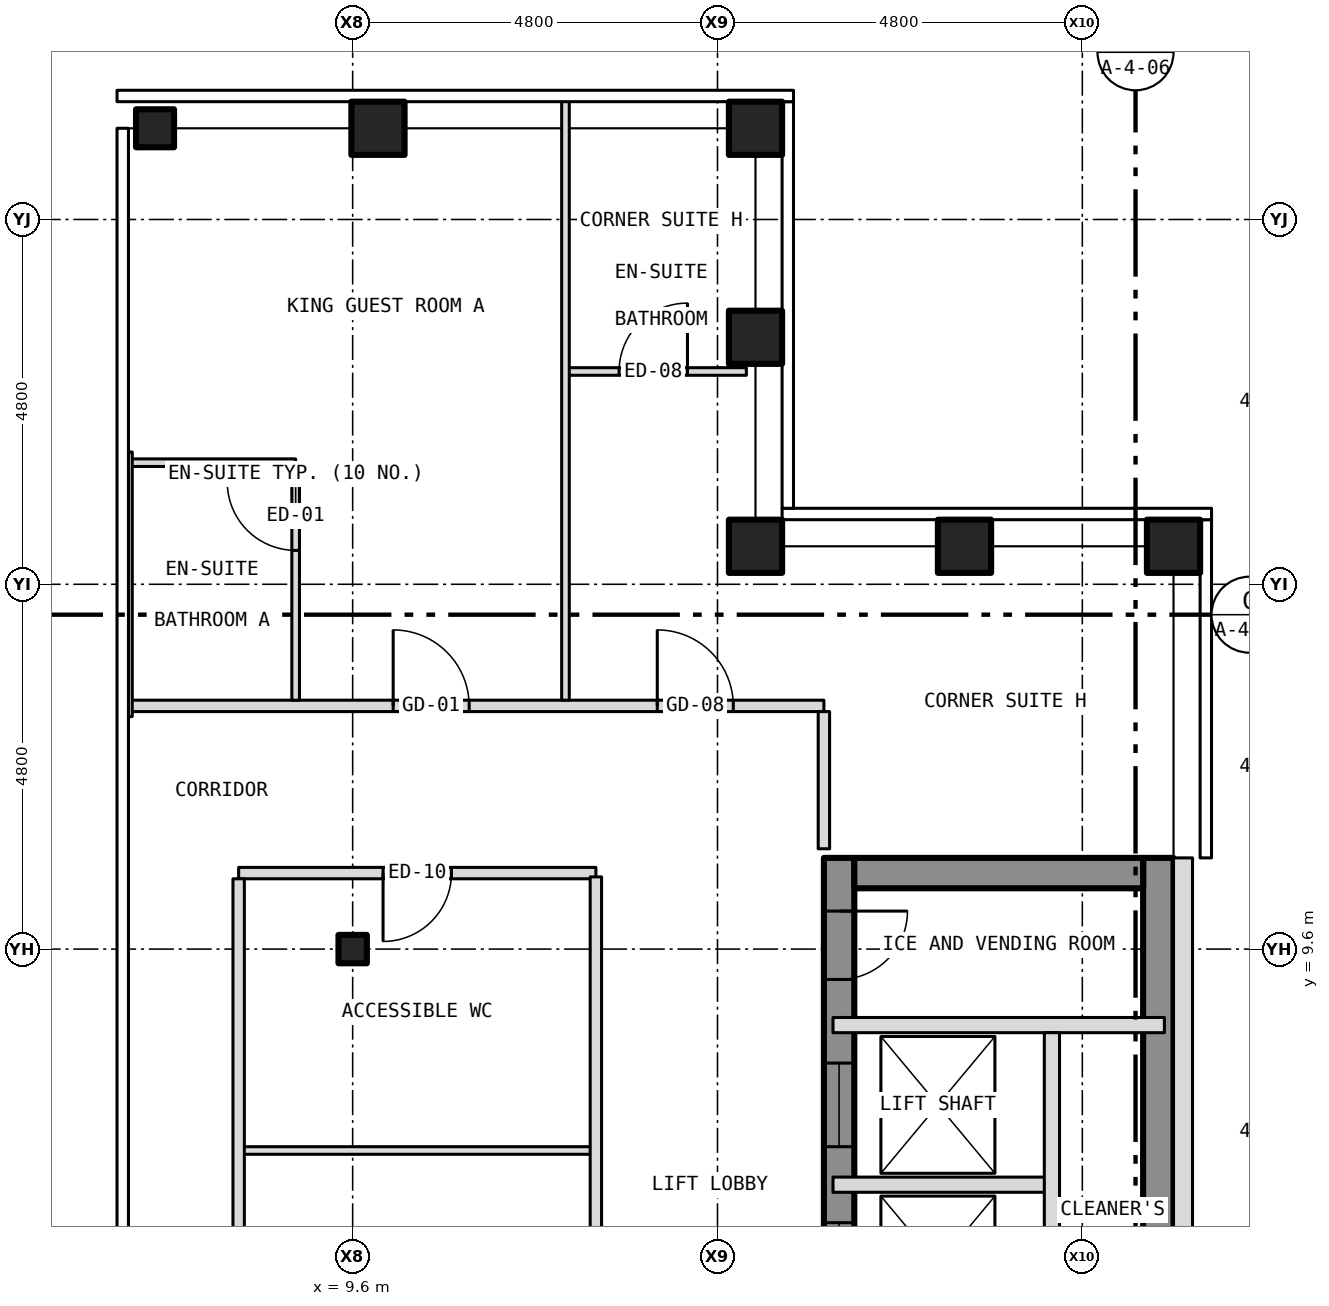
"""IFC4 building model, lengths in metres.
Left out: names, types, materials, properties, quantities, classifications, styles, units other than length and angle.
Written with IfcOpenShell. Run it as: python <this file> out.ifc"""

import sys

from ifc_helpers import new_model, si_unit, direction, frame, frame_2d, origin, origin_2d, place, context, subcontext, project, spatial, rectangle, hollow_rectangle, i_section, extrude, element, fill, save


model = new_model("IFC4")
c1 = context("Model", 3, precision=1e-05, world=origin(), true_north=direction((0.0, 1.0)))
c2 = subcontext(c1, "Body", "Model", "MODEL_VIEW")
j1 = project(units=[si_unit("LENGTHUNIT", "METRE"), si_unit("PLANEANGLEUNIT", "RADIAN")], contexts=[c1])
p1 = place(None, origin())
s1 = spatial("IfcSite", under=j1, at=p1, CompositionType="ELEMENT")
p2 = place(p1, origin())
s2 = spatial("IfcBuilding", under=s1, at=p2, CompositionType="ELEMENT")
p3 = place(p2, frame((0.0, 0.0, 222.5)))
s3 = spatial("IfcBuildingStorey", under=s2, at=p3, CompositionType="ELEMENT", Elevation=222.5)
for number, where, z_axis, x_axis in (
    (1, (9.933, 20.4, -0.15), (0.0, 0.0, 1.0), (1.0, 0.0, 0.0)),
    (2, (14.9, 20.4, -0.15), (0.0, 0.0, 1.0), (1.0, 0.0, 0.0)),
    (3, (20.4, 14.9, -0.15), (0.0, 0.0, 1.0), (1.0, 0.0, 0.0)),
    (4, (14.9, 14.9, -0.15), (0.0, 0.0, 1.0), (1.0, 0.0, 0.0)),
    (5, (14.9, 17.65, -0.15), (0.0, 0.0, 1.0), (1.0, 0.0, 0.0)),
    (6, (17.65, 14.9, -0.15), (0.0, 0.0, 1.0), (1.0, 0.0, 0.0)),
):
    element("IfcColumn", number, at=place(p3, frame(where, z_axis=z_axis, x_axis=x_axis)), inside=s3, PredefinedType="COLUMN", context=c2, shape_type="SweptSolid", body=[
        extrude(hollow_rectangle(XDim=0.7, YDim=0.7, WallThickness=0.04, at=origin_2d()), origin(), (0.0, 0.0, 1.0), 3.5),
    ])
p4 = place(p3, frame((7.0, 20.4, -0.15), z_axis=(0.0, 0.0, 1.0), x_axis=(1.0, 0.0, 0.0)))
e7 = element("IfcColumn", 7, at=p4, inside=s3, PredefinedType="COLUMN", context=c2, shape_type="SweptSolid", body=[
    extrude(hollow_rectangle(XDim=0.5, YDim=0.5, WallThickness=0.03, at=origin_2d()), origin(), (0.0, 0.0, 1.0), 3.5),
])
p5 = place(p3, frame((9.6, 9.6, -0.15), z_axis=(0.0, 0.0, 1.0), x_axis=(1.0, 0.0, 0.0)))
e8 = element("IfcColumn", 8, at=p5, inside=s3, PredefinedType="COLUMN", context=c2, shape_type="SweptSolid", body=[
    extrude(i_section(OverallWidth=0.373, OverallDepth=0.373, WebThickness=0.016, FlangeThickness=0.026, at=origin_2d()), origin(), (0.0, 0.0, 1.0), 3.5),
])
p6 = place(p3, frame((16.0, -10.8, 0.0), z_axis=(0.0, 0.0, 1.0), x_axis=(0.0, 1.0, 0.0)))
e9 = element("IfcWall", 9, at=p6, inside=s3, PredefinedType="SHEAR", context=c2, shape_type="SweptSolid", body=[
    extrude(rectangle(XDim=21.6, YDim=0.4, at=frame_2d((10.8, 0.0))), origin(), (0.0, 0.0, 1.0), 3.25),
])
p7 = place(p6, frame((9.4, 0.0, 0.0)))
e10 = element("IfcOpeningElement", 10, at=p7, cuts=e9, PredefinedType="OPENING", context=c2, shape_type="SweptSolid", body=[
    extrude(rectangle(XDim=1.1, YDim=2.1, at=frame_2d((0.55, 1.05))), frame((0.0, 0.212, 0.0), z_axis=(0.0, -1.0, 0.0), x_axis=(1.0, 0.0, 0.0)), (0.0, 0.0, 1.0), 0.424),
])
p8 = place(p6, frame((11.5, 0.0, 0.0)))
e11 = element("IfcOpeningElement", 11, at=p8, cuts=e9, PredefinedType="OPENING", context=c2, shape_type="SweptSolid", body=[
    extrude(rectangle(XDim=1.1, YDim=2.1, at=frame_2d((0.55, 1.05))), frame((0.0, 0.212, 0.0), z_axis=(0.0, -1.0, 0.0), x_axis=(1.0, 0.0, 0.0)), (0.0, 0.0, 1.0), 0.424),
])
p9 = place(p6, frame((13.6, 0.0, 0.0)))
e12 = element("IfcOpeningElement", 12, at=p9, cuts=e9, PredefinedType="OPENING", context=c2, shape_type="SweptSolid", body=[
    extrude(rectangle(XDim=1.1, YDim=2.1, at=frame_2d((0.55, 1.05))), frame((0.0, 0.212, 0.0), z_axis=(0.0, -1.0, 0.0), x_axis=(1.0, 0.0, 0.0)), (0.0, 0.0, 1.0), 0.424),
])
p10 = place(p6, frame((15.7, 0.0, 0.0)))
e13 = element("IfcOpeningElement", 13, at=p10, cuts=e9, PredefinedType="OPENING", context=c2, shape_type="SweptSolid", body=[
    extrude(rectangle(XDim=1.1, YDim=2.1, at=frame_2d((0.55, 1.05))), frame((0.0, 0.212, 0.0), z_axis=(0.0, -1.0, 0.0), x_axis=(1.0, 0.0, 0.0)), (0.0, 0.0, 1.0), 0.424),
])
p11 = place(p6, frame((17.8, 0.0, 0.0)))
e14 = element("IfcOpeningElement", 14, at=p11, cuts=e9, PredefinedType="OPENING", context=c2, shape_type="SweptSolid", body=[
    extrude(rectangle(XDim=1.1, YDim=2.1, at=frame_2d((0.55, 1.05))), frame((0.0, 0.212, 0.0), z_axis=(0.0, -1.0, 0.0), x_axis=(1.0, 0.0, 0.0)), (0.0, 0.0, 1.0), 0.424),
])
p12 = place(p6, frame((5.642, 0.0, 0.0)))
e15 = element("IfcOpeningElement", 15, at=p12, cuts=e9, PredefinedType="OPENING", context=c2, shape_type="SweptSolid", body=[
    extrude(rectangle(XDim=1.1, YDim=2.1, at=frame_2d((0.55, 1.05))), frame((0.0, 0.212, 0.0), z_axis=(0.0, -1.0, 0.0), x_axis=(1.0, 0.0, 0.0)), (0.0, 0.0, 1.0), 0.424),
])
p13 = place(p6, frame((7.5, 0.0, 0.0)))
e16 = element("IfcOpeningElement", 16, at=p13, cuts=e9, PredefinedType="OPENING", context=c2, shape_type="SweptSolid", body=[
    extrude(rectangle(XDim=1.1, YDim=2.1, at=frame_2d((0.55, 1.05))), frame((0.0, 0.212, 0.0), z_axis=(0.0, -1.0, 0.0), x_axis=(1.0, 0.0, 0.0)), (0.0, 0.0, 1.0), 0.424),
])
p14 = place(p6, frame((20.0, 0.0, 0.0)))
e17 = element("IfcOpeningElement", 17, at=p14, cuts=e9, PredefinedType="OPENING", context=c2, shape_type="SweptSolid", body=[
    extrude(rectangle(XDim=0.9, YDim=2.1, at=frame_2d((0.45, 1.05))), frame((0.0, 0.212, 0.0), z_axis=(0.0, -1.0, 0.0), x_axis=(1.0, 0.0, 0.0)), (0.0, 0.0, 1.0), 0.424),
])
p15 = place(p3, frame((20.2, -10.8, 0.0), z_axis=(0.0, 0.0, 1.0), x_axis=(0.0, 1.0, 0.0)))
e18 = element("IfcWall", 18, at=p15, inside=s3, PredefinedType="SHEAR", context=c2, shape_type="SweptSolid", body=[
    extrude(rectangle(XDim=21.6, YDim=0.4, at=frame_2d((10.8, 0.0))), origin(), (0.0, 0.0, 1.0), 3.25),
])
p16 = place(p3, frame((16.2, 10.6, 0.0), z_axis=(0.0, 0.0, 1.0), x_axis=(1.0, 0.0, 0.0)))
e19 = element("IfcWall", 19, at=p16, inside=s3, PredefinedType="SHEAR", context=c2, shape_type="SweptSolid", body=[
    extrude(rectangle(XDim=3.8, YDim=0.4, at=frame_2d((1.9, 0.0))), origin(), (0.0, 0.0, 1.0), 3.25),
])
p17 = place(p3, frame((20.525, -10.8, 0.0), z_axis=(0.0, 0.0, 1.0), x_axis=(0.0, 1.0, 0.0)))
e20 = element("IfcWall", 20, at=p17, inside=s3, PredefinedType="SOLIDWALL", context=c2, shape_type="SweptSolid", body=[
    extrude(rectangle(XDim=21.6, YDim=0.25, at=frame_2d((10.8, 0.0))), origin(), (0.0, 0.0, 1.0), 3.5),
])
p18 = place(p17, frame((2.95, 0.0, 1.0)))
e21 = element("IfcOpeningElement", 21, at=p18, cuts=e20, PredefinedType="OPENING", context=c2, shape_type="SweptSolid", body=[
    extrude(rectangle(XDim=0.6, YDim=1.5, at=frame_2d((0.3, 0.75))), frame((0.0, 0.137, 0.0), z_axis=(0.0, -1.0, 0.0), x_axis=(1.0, 0.0, 0.0)), (0.0, 0.0, 1.0), 0.274),
])
p19 = place(p3, frame((15.92, 6.5, 0.0), z_axis=(0.0, 0.0, 1.0), x_axis=(1.0, 0.0, 0.0)))
e22 = element("IfcWall", 22, at=p19, inside=s3, PredefinedType="PARTITIONING", context=c2, shape_type="SweptSolid", body=[
    extrude(rectangle(XDim=2.88, YDim=0.2, at=frame_2d((1.44, 0.0))), origin(), (0.0, 0.0, 1.0), 3.25),
])
p20 = place(p3, frame((8.1, 6.95, 0.0), z_axis=(0.0, 0.0, 1.0), x_axis=(1.0, 0.0, 0.0)))
e23 = element("IfcWall", 23, at=p20, inside=s3, PredefinedType="PARTITIONING", context=c2, shape_type="SweptSolid", body=[
    extrude(rectangle(XDim=4.7, YDim=0.1, at=frame_2d((2.35, 0.0))), origin(), (0.0, 0.0, 1.0), 3.35),
])
p21 = place(p3, frame((15.92, 8.6, 0.0), z_axis=(0.0, 0.0, 1.0), x_axis=(1.0, 0.0, 0.0)))
e24 = element("IfcWall", 24, at=p21, inside=s3, PredefinedType="PARTITIONING", context=c2, shape_type="SweptSolid", body=[
    extrude(rectangle(XDim=4.36, YDim=0.2, at=frame_2d((2.18, 0.0))), origin(), (0.0, 0.0, 1.0), 3.25),
])
p22 = place(p3, frame((8.1, 10.6, 0.0), z_axis=(0.0, 0.0, 1.0), x_axis=(1.0, 0.0, 0.0)))
e25 = element("IfcWall", 25, at=p22, inside=s3, PredefinedType="PARTITIONING", context=c2, shape_type="SweptSolid", body=[
    extrude(rectangle(XDim=4.7, YDim=0.15, at=frame_2d((2.35, 0.0))), origin(), (0.0, 0.0, 1.0), 3.35),
])
p23 = place(p22, frame((1.9, 0.0, 0.0)))
e26 = element("IfcOpeningElement", 26, at=p23, cuts=e25, PredefinedType="OPENING", context=c2, shape_type="SweptSolid", body=[
    extrude(rectangle(XDim=0.9, YDim=2.1, at=frame_2d((0.45, 1.05))), frame((0.0, 0.087, 0.0), z_axis=(0.0, -1.0, 0.0), x_axis=(1.0, 0.0, 0.0)), (0.0, 0.0, 1.0), 0.174),
])
p24 = place(p3, frame((6.65, 12.8, 0.0), z_axis=(0.0, 0.0, 1.0), x_axis=(1.0, 0.0, 0.0)))
e27 = element("IfcWall", 27, at=p24, inside=s3, PredefinedType="PARTITIONING", context=c2, shape_type="SweptSolid", body=[
    extrude(rectangle(XDim=9.15, YDim=0.15, at=frame_2d((4.575, 0.0))), origin(), (0.0, 0.0, 1.0), 3.35),
])
p25 = place(p24, frame((3.483, 0.0, 0.0)))
e28 = element("IfcOpeningElement", 28, at=p25, cuts=e27, PredefinedType="OPENING", context=c2, shape_type="SweptSolid", body=[
    extrude(rectangle(XDim=1.0, YDim=2.1, at=frame_2d((0.5, 1.05))), frame((0.0, 0.087, 0.0), z_axis=(0.0, -1.0, 0.0), x_axis=(1.0, 0.0, 0.0)), (0.0, 0.0, 1.0), 0.174),
])
p26 = place(p24, frame((6.958, 0.0, 0.0)))
e29 = element("IfcOpeningElement", 29, at=p26, cuts=e27, PredefinedType="OPENING", context=c2, shape_type="SweptSolid", body=[
    extrude(rectangle(XDim=1.0, YDim=2.1, at=frame_2d((0.5, 1.05))), frame((0.0, 0.087, 0.0), z_axis=(0.0, -1.0, 0.0), x_axis=(1.0, 0.0, 0.0)), (0.0, 0.0, 1.0), 0.174),
])
p27 = place(p3, frame((6.65, 16.0, 0.0), z_axis=(0.0, 0.0, 1.0), x_axis=(1.0, 0.0, 0.0)))
e30 = element("IfcWall", 30, at=p27, inside=s3, PredefinedType="PARTITIONING", context=c2, shape_type="SweptSolid", body=[
    extrude(rectangle(XDim=2.2, YDim=0.1, at=frame_2d((1.1, 0.0))), origin(), (0.0, 0.0, 1.0), 3.35),
])
p28 = place(p3, frame((12.4, 17.2, 0.0), z_axis=(0.0, 0.0, 1.0), x_axis=(1.0, 0.0, 0.0)))
e31 = element("IfcWall", 31, at=p28, inside=s3, PredefinedType="PARTITIONING", context=c2, shape_type="SweptSolid", body=[
    extrude(rectangle(XDim=2.38, YDim=0.1, at=frame_2d((1.19, 0.0))), origin(), (0.0, 0.0, 1.0), 3.35),
])
p29 = place(p28, frame((0.705, 0.0, 0.0)))
e32 = element("IfcOpeningElement", 32, at=p29, cuts=e31, PredefinedType="OPENING", context=c2, shape_type="SweptSolid", body=[
    extrude(rectangle(XDim=0.9, YDim=2.1, at=frame_2d((0.45, 1.05))), frame((0.0, 0.062, 0.0), z_axis=(0.0, -1.0, 0.0), x_axis=(1.0, 0.0, 0.0)), (0.0, 0.0, 1.0), 0.124),
])
p30 = place(p3, frame((6.65, 12.66, 0.0), z_axis=(0.0, 0.0, 1.0), x_axis=(0.0, 1.0, 0.0)))
e33 = element("IfcWall", 33, at=p30, inside=s3, PredefinedType="PARTITIONING", context=c2, shape_type="SweptSolid", body=[
    extrude(rectangle(XDim=3.48, YDim=0.1, at=frame_2d((1.74, 0.0))), origin(), (0.0, 0.0, 1.0), 3.35),
])
p31 = place(p3, frame((8.1, 3.375, 0.0), z_axis=(0.0, 0.0, 1.0), x_axis=(0.0, 1.0, 0.0)))
e34 = element("IfcWall", 34, at=p31, inside=s3, PredefinedType="PARTITIONING", context=c2, shape_type="SweptSolid", body=[
    extrude(rectangle(XDim=7.15, YDim=0.15, at=frame_2d((3.575, 0.0))), origin(), (0.0, 0.0, 1.0), 3.35),
])
p32 = place(p3, frame((8.85, 12.875, 0.0), z_axis=(0.0, 0.0, 1.0), x_axis=(0.0, 1.0, 0.0)))
e35 = element("IfcWall", 35, at=p32, inside=s3, PredefinedType="PARTITIONING", context=c2, shape_type="SweptSolid", body=[
    extrude(rectangle(XDim=3.075, YDim=0.1, at=frame_2d((1.538, 0.0))), origin(), (0.0, 0.0, 1.0), 3.35),
])
p33 = place(p32, frame((1.971, 0.0, 0.0)))
e36 = element("IfcOpeningElement", 36, at=p33, cuts=e35, PredefinedType="OPENING", context=c2, shape_type="SweptSolid", body=[
    extrude(rectangle(XDim=0.9, YDim=2.1, at=frame_2d((0.45, 1.05))), frame((0.0, 0.062, 0.0), z_axis=(0.0, -1.0, 0.0), x_axis=(1.0, 0.0, 0.0)), (0.0, 0.0, 1.0), 0.124),
])
p34 = place(p3, frame((12.4, 12.875, 0.0), z_axis=(0.0, 0.0, 1.0), x_axis=(0.0, 1.0, 0.0)))
e37 = element("IfcWall", 37, at=p34, inside=s3, PredefinedType="PARTITIONING", context=c2, shape_type="SweptSolid", body=[
    extrude(rectangle(XDim=7.905, YDim=0.1, at=frame_2d((3.953, 0.0))), origin(), (0.0, 0.0, 1.0), 3.35),
])
p35 = place(p3, frame((12.8, 3.375, 0.0), z_axis=(0.0, 0.0, 1.0), x_axis=(0.0, 1.0, 0.0)))
e38 = element("IfcWall", 38, at=p35, inside=s3, PredefinedType="PARTITIONING", context=c2, shape_type="SweptSolid", body=[
    extrude(rectangle(XDim=7.175, YDim=0.15, at=frame_2d((3.587, 0.0))), origin(), (0.0, 0.0, 1.0), 3.35),
])
p36 = place(p3, frame((15.8, 10.92, 0.0), z_axis=(0.0, 0.0, 1.0), x_axis=(0.0, 1.0, 0.0)))
e39 = element("IfcWall", 39, at=p36, inside=s3, PredefinedType="PARTITIONING", context=c2, shape_type="SweptSolid", body=[
    extrude(rectangle(XDim=1.805, YDim=0.15, at=frame_2d((0.903, 0.0))), origin(), (0.0, 0.0, 1.0), 3.35),
])
p37 = place(p3, frame((18.8, -1.8, 0.0), z_axis=(0.0, 0.0, 1.0), x_axis=(0.0, 1.0, 0.0)))
e40 = element("IfcWall", 40, at=p37, inside=s3, PredefinedType="PARTITIONING", context=c2, shape_type="SweptSolid", body=[
    extrude(rectangle(XDim=10.3, YDim=0.2, at=frame_2d((5.15, 0.0))), origin(), (0.0, 0.0, 1.0), 3.25),
])
p38 = place(p10, origin())
e41 = element("IfcDoor", 41, at=p38, inside=s3, OperationType="SLIDING_TO_LEFT", PredefinedType="DOOR", context=c2, shape_type="SweptSolid", body=[
    extrude(rectangle(XDim=1.1, YDim=2.1, at=frame_2d((0.55, 1.05))), frame((0.0, 0.025, 0.0), z_axis=(0.0, -1.0, 0.0), x_axis=(1.0, 0.0, 0.0)), (0.0, 0.0, 1.0), 0.05),
])
fill(e13, e41)
p39 = place(p11, origin())
e42 = element("IfcDoor", 42, at=p39, inside=s3, OperationType="SLIDING_TO_LEFT", PredefinedType="DOOR", context=c2, shape_type="SweptSolid", body=[
    extrude(rectangle(XDim=1.1, YDim=2.1, at=frame_2d((0.55, 1.05))), frame((0.0, 0.025, 0.0), z_axis=(0.0, -1.0, 0.0), x_axis=(1.0, 0.0, 0.0)), (0.0, 0.0, 1.0), 0.05),
])
fill(e14, e42)
p40 = place(p14, origin())
e43 = element("IfcDoor", 43, at=p40, inside=s3, OperationType="SINGLE_SWING_RIGHT", PredefinedType="DOOR", context=c2, shape_type="SweptSolid", body=[
    extrude(rectangle(XDim=0.9, YDim=2.1, at=frame_2d((0.45, 1.05))), frame((0.0, 0.025, 0.0), z_axis=(0.0, -1.0, 0.0), x_axis=(1.0, 0.0, 0.0)), (0.0, 0.0, 1.0), 0.05),
])
fill(e17, e43)
p41 = place(p25, origin())
e44 = element("IfcDoor", 44, at=p41, inside=s3, OperationType="SINGLE_SWING_LEFT", PredefinedType="DOOR", context=c2, shape_type="SweptSolid", body=[
    extrude(rectangle(XDim=1.0, YDim=2.1, at=frame_2d((0.5, 1.05))), frame((0.0, 0.025, 0.0), z_axis=(0.0, -1.0, 0.0), x_axis=(1.0, 0.0, 0.0)), (0.0, 0.0, 1.0), 0.05),
])
fill(e28, e44)
p42 = place(p33, origin())
e45 = element("IfcDoor", 45, at=p42, inside=s3, OperationType="SINGLE_SWING_RIGHT", PredefinedType="DOOR", context=c2, shape_type="SweptSolid", body=[
    extrude(rectangle(XDim=0.9, YDim=2.1, at=frame_2d((0.45, 1.05))), frame((0.0, 0.025, 0.0), z_axis=(0.0, -1.0, 0.0), x_axis=(1.0, 0.0, 0.0)), (0.0, 0.0, 1.0), 0.05),
])
fill(e36, e45)
p43 = place(p29, origin())
e46 = element("IfcDoor", 46, at=p43, inside=s3, OperationType="SINGLE_SWING_RIGHT", PredefinedType="DOOR", context=c2, shape_type="SweptSolid", body=[
    extrude(rectangle(XDim=0.9, YDim=2.1, at=frame_2d((0.45, 1.05))), frame((0.0, 0.025, 0.0), z_axis=(0.0, -1.0, 0.0), x_axis=(1.0, 0.0, 0.0)), (0.0, 0.0, 1.0), 0.05),
])
fill(e32, e46)
p44 = place(p26, origin())
e47 = element("IfcDoor", 47, at=p44, inside=s3, OperationType="SINGLE_SWING_LEFT", PredefinedType="DOOR", context=c2, shape_type="SweptSolid", body=[
    extrude(rectangle(XDim=1.0, YDim=2.1, at=frame_2d((0.5, 1.05))), frame((0.0, 0.025, 0.0), z_axis=(0.0, -1.0, 0.0), x_axis=(1.0, 0.0, 0.0)), (0.0, 0.0, 1.0), 0.05),
])
fill(e29, e47)
p45 = place(p23, origin())
e48 = element("IfcDoor", 48, at=p45, inside=s3, OperationType="SINGLE_SWING_LEFT", PredefinedType="DOOR", context=c2, shape_type="SweptSolid", body=[
    extrude(rectangle(XDim=0.9, YDim=2.1, at=frame_2d((0.45, 1.05))), frame((0.0, 0.025, 0.0), z_axis=(0.0, -1.0, 0.0), x_axis=(1.0, 0.0, 0.0)), (0.0, 0.0, 1.0), 0.05),
])
fill(e26, e48)
save(model, sys.argv[1])
